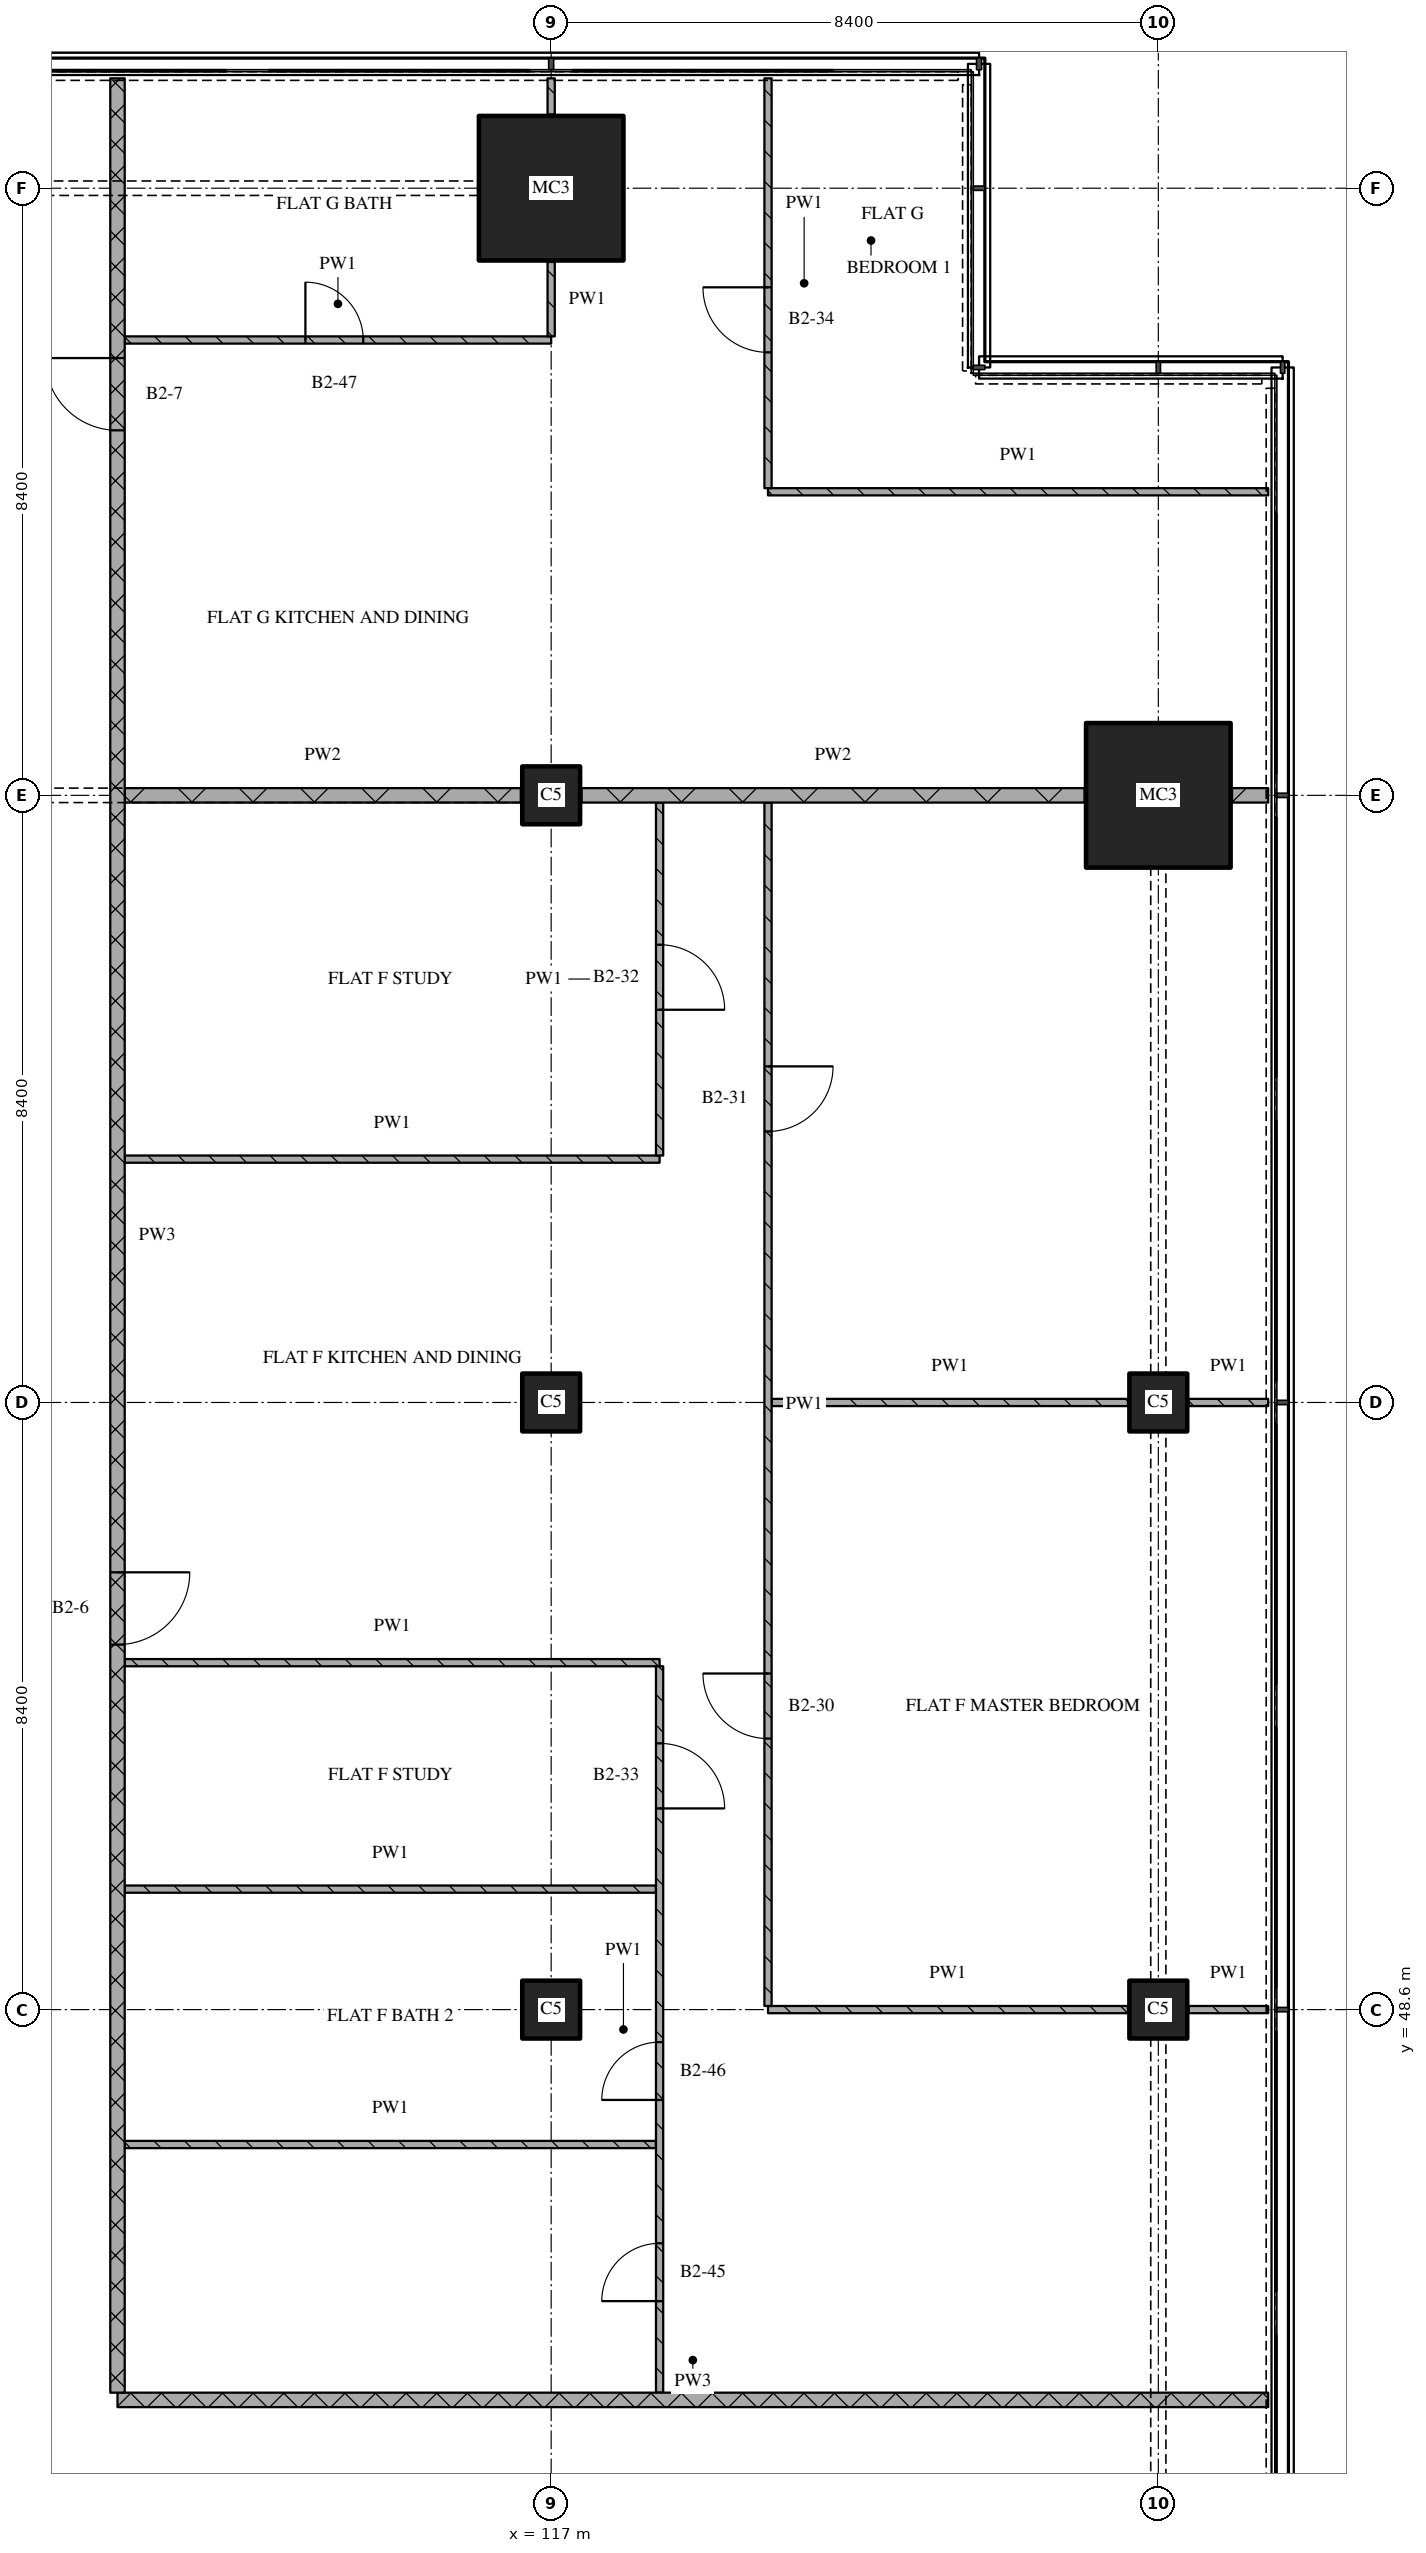
"""IFC4 building model, lengths in metres.
Left out: names, types, materials, properties, quantities, classifications, styles, units other than length and angle.
Written with IfcOpenShell. Run it as: python <this file> out.ifc"""

import sys

from ifc_helpers import new_model, si_unit, direction, frame, frame_2d, origin, origin_2d, place, context, subcontext, project, spatial, rectangle, extrude, element, fill, save


model = new_model("IFC4")
c1 = context("Model", 3, precision=1e-05, world=origin(), true_north=direction((0.0, 1.0)))
c2 = subcontext(c1, "Body", "Model", "MODEL_VIEW")
j1 = project(units=[si_unit("LENGTHUNIT", "METRE"), si_unit("PLANEANGLEUNIT", "RADIAN")], contexts=[c1])
p1 = place(None, origin())
s1 = spatial("IfcSite", under=j1, at=p1, CompositionType="ELEMENT")
p2 = place(p1, origin())
s2 = spatial("IfcBuilding", under=s1, at=p2, CompositionType="ELEMENT")
p3 = place(p2, frame((0.0, 0.0, 109.65)))
s3 = spatial("IfcBuildingStorey", under=s2, at=p3, CompositionType="ELEMENT", Elevation=109.65)
for number, where, z_axis, x_axis in (
    (1, (117.0, 48.6, 0.0), (0.0, 0.0, 1.0), (1.0, 0.0, 0.0)),
    (2, (117.0, 57.0, 0.0), (0.0, 0.0, 1.0), (1.0, 0.0, 0.0)),
    (3, (117.0, 65.4, 0.0), (0.0, 0.0, 1.0), (1.0, 0.0, 0.0)),
):
    element("IfcColumn", number, at=place(p3, frame(where, z_axis=z_axis, x_axis=x_axis)), inside=s3, PredefinedType="COLUMN", context=c2, shape_type="SweptSolid", body=[
        extrude(rectangle(XDim=0.8, YDim=0.8, at=origin_2d()), origin(), (0.0, 0.0, 1.0), 3.6),
    ])
p4 = place(p3, frame((117.0, 73.8, 0.0), z_axis=(0.0, 0.0, 1.0), x_axis=(1.0, 0.0, 0.0)))
e4 = element("IfcColumn", 4, at=p4, inside=s3, PredefinedType="COLUMN", context=c2, shape_type="SweptSolid", body=[
    extrude(rectangle(XDim=2.0, YDim=2.0, at=origin_2d()), origin(), (0.0, 0.0, 1.0), 3.6),
])
for number, where, z_axis, x_axis in (
    (5, (125.4, 48.6, 0.0), (0.0, 0.0, 1.0), (1.0, 0.0, 0.0)),
    (6, (125.4, 57.0, 0.0), (0.0, 0.0, 1.0), (1.0, 0.0, 0.0)),
):
    element("IfcColumn", number, at=place(p3, frame(where, z_axis=z_axis, x_axis=x_axis)), inside=s3, PredefinedType="COLUMN", context=c2, shape_type="SweptSolid", body=[
        extrude(rectangle(XDim=0.8, YDim=0.8, at=origin_2d()), origin(), (0.0, 0.0, 1.0), 3.6),
    ])
p5 = place(p3, frame((125.4, 65.4, 0.0), z_axis=(0.0, 0.0, 1.0), x_axis=(1.0, 0.0, 0.0)))
e7 = element("IfcColumn", 7, at=p5, inside=s3, PredefinedType="COLUMN", context=c2, shape_type="SweptSolid", body=[
    extrude(rectangle(XDim=2.0, YDim=2.0, at=origin_2d()), origin(), (0.0, 0.0, 1.0), 3.6),
])
p6 = place(p3, frame((111.0, 43.2, 0.0), z_axis=(0.0, 0.0, 1.0), x_axis=(1.0, 0.0, 0.0)))
e8 = element("IfcWall", 8, at=p6, inside=s3, PredefinedType="PARTITIONING", context=c2, shape_type="SweptSolid", body=[
    extrude(rectangle(XDim=15.92, YDim=0.2, at=frame_2d((7.96, 0.0))), origin(), (0.0, 0.0, 1.0), 3.32),
])
p7 = place(p3, frame((111.1, 46.733, 0.0), z_axis=(0.0, 0.0, 1.0), x_axis=(1.0, 0.0, 0.0)))
e9 = element("IfcWall", 9, at=p7, inside=s3, PredefinedType="PARTITIONING", context=c2, shape_type="SweptSolid", body=[
    extrude(rectangle(XDim=7.35, YDim=0.1, at=frame_2d((3.675, 0.0))), origin(), (0.0, 0.0, 1.0), 3.32),
])
p8 = place(p3, frame((120.0, 48.6, 0.0), z_axis=(0.0, 0.0, 1.0), x_axis=(1.0, 0.0, 0.0)))
e10 = element("IfcWall", 10, at=p8, inside=s3, PredefinedType="PARTITIONING", context=c2, shape_type="SweptSolid", body=[
    extrude(rectangle(XDim=4.98, YDim=0.1, at=frame_2d((2.49, 0.0))), origin(), (0.0, 0.0, 1.0), 3.32),
])
p9 = place(p3, frame((125.82, 48.6, 0.0), z_axis=(0.0, 0.0, 1.0), x_axis=(1.0, 0.0, 0.0)))
e11 = element("IfcWall", 11, at=p9, inside=s3, PredefinedType="PARTITIONING", context=c2, shape_type="SweptSolid", body=[
    extrude(rectangle(XDim=1.1, YDim=0.1, at=frame_2d((0.55, 0.0))), origin(), (0.0, 0.0, 1.0), 3.32),
])
p10 = place(p3, frame((111.1, 50.267, 0.0), z_axis=(0.0, 0.0, 1.0), x_axis=(1.0, 0.0, 0.0)))
e12 = element("IfcWall", 12, at=p10, inside=s3, PredefinedType="PARTITIONING", context=c2, shape_type="SweptSolid", body=[
    extrude(rectangle(XDim=7.35, YDim=0.1, at=frame_2d((3.675, 0.0))), origin(), (0.0, 0.0, 1.0), 3.32),
])
p11 = place(p3, frame((111.1, 53.4, 0.0), z_axis=(0.0, 0.0, 1.0), x_axis=(1.0, 0.0, 0.0)))
e13 = element("IfcWall", 13, at=p11, inside=s3, PredefinedType="PARTITIONING", context=c2, shape_type="SweptSolid", body=[
    extrude(rectangle(XDim=7.4, YDim=0.1, at=frame_2d((3.7, 0.0))), origin(), (0.0, 0.0, 1.0), 3.32),
])
p12 = place(p3, frame((120.05, 57.0, 0.0), z_axis=(0.0, 0.0, 1.0), x_axis=(1.0, 0.0, 0.0)))
e14 = element("IfcWall", 14, at=p12, inside=s3, PredefinedType="PARTITIONING", context=c2, shape_type="SweptSolid", body=[
    extrude(rectangle(XDim=4.93, YDim=0.1, at=frame_2d((2.465, 0.0))), origin(), (0.0, 0.0, 1.0), 3.32),
])
p13 = place(p3, frame((125.82, 57.0, 0.0), z_axis=(0.0, 0.0, 1.0), x_axis=(1.0, 0.0, 0.0)))
e15 = element("IfcWall", 15, at=p13, inside=s3, PredefinedType="PARTITIONING", context=c2, shape_type="SweptSolid", body=[
    extrude(rectangle(XDim=1.1, YDim=0.1, at=frame_2d((0.55, 0.0))), origin(), (0.0, 0.0, 1.0), 3.32),
])
p14 = place(p3, frame((111.1, 60.367, 0.0), z_axis=(0.0, 0.0, 1.0), x_axis=(1.0, 0.0, 0.0)))
e16 = element("IfcWall", 16, at=p14, inside=s3, PredefinedType="PARTITIONING", context=c2, shape_type="SweptSolid", body=[
    extrude(rectangle(XDim=7.4, YDim=0.1, at=frame_2d((3.7, 0.0))), origin(), (0.0, 0.0, 1.0), 3.32),
])
p15 = place(p3, frame((111.1, 65.4, 0.0), z_axis=(0.0, 0.0, 1.0), x_axis=(1.0, 0.0, 0.0)))
e17 = element("IfcWall", 17, at=p15, inside=s3, PredefinedType="PARTITIONING", context=c2, shape_type="SweptSolid", body=[
    extrude(rectangle(XDim=5.48, YDim=0.2, at=frame_2d((2.74, 0.0))), origin(), (0.0, 0.0, 1.0), 2.82),
])
p16 = place(p3, frame((117.42, 65.4, 0.0), z_axis=(0.0, 0.0, 1.0), x_axis=(1.0, 0.0, 0.0)))
e18 = element("IfcWall", 18, at=p16, inside=s3, PredefinedType="PARTITIONING", context=c2, shape_type="SweptSolid", body=[
    extrude(rectangle(XDim=6.96, YDim=0.2, at=frame_2d((3.48, 0.0))), origin(), (0.0, 0.0, 1.0), 3.32),
])
p17 = place(p3, frame((126.42, 65.4, 0.0), z_axis=(0.0, 0.0, 1.0), x_axis=(1.0, 0.0, 0.0)))
e19 = element("IfcWall", 19, at=p17, inside=s3, PredefinedType="PARTITIONING", context=c2, shape_type="SweptSolid", body=[
    extrude(rectangle(XDim=0.5, YDim=0.2, at=frame_2d((0.25, 0.0))), origin(), (0.0, 0.0, 1.0), 3.32),
])
p18 = place(p3, frame((120.0, 69.6, 0.0), z_axis=(0.0, 0.0, 1.0), x_axis=(1.0, 0.0, 0.0)))
e20 = element("IfcWall", 20, at=p18, inside=s3, PredefinedType="PARTITIONING", context=c2, shape_type="SweptSolid", body=[
    extrude(rectangle(XDim=6.92, YDim=0.1, at=frame_2d((3.46, 0.0))), origin(), (0.0, 0.0, 1.0), 3.32),
])
p19 = place(p3, frame((111.1, 71.7, 0.0), z_axis=(0.0, 0.0, 1.0), x_axis=(1.0, 0.0, 0.0)))
e21 = element("IfcWall", 21, at=p19, inside=s3, PredefinedType="PARTITIONING", context=c2, shape_type="SweptSolid", body=[
    extrude(rectangle(XDim=5.9, YDim=0.1, at=frame_2d((2.95, 0.0))), origin(), (0.0, 0.0, 1.0), 3.32),
])
p20 = place(p19, frame((2.5, 0.0, 0.0)))
e22 = element("IfcOpeningElement", 22, at=p20, cuts=e21, PredefinedType="OPENING", context=c2, shape_type="SweptSolid", body=[
    extrude(rectangle(XDim=0.8, YDim=2.1, at=frame_2d((0.4, 1.05))), frame((0.0, 0.06, 0.0), z_axis=(0.0, -1.0, 0.0), x_axis=(1.0, 0.0, 0.0)), (0.0, 0.0, 1.0), 0.12),
])
p21 = place(p3, frame((111.0, 75.32, 0.0), z_axis=(0.0, 0.0, 1.0), x_axis=(0.0, -1.0, 0.0)))
e23 = element("IfcWall", 23, at=p21, inside=s3, PredefinedType="PARTITIONING", context=c2, shape_type="SweptSolid", body=[
    extrude(rectangle(XDim=32.02, YDim=0.2, at=frame_2d((16.01, 0.0))), origin(), (0.0, 0.0, 1.0), 3.32),
])
p22 = place(p21, frame((3.87, 0.0, 0.0)))
e24 = element("IfcOpeningElement", 24, at=p22, cuts=e23, PredefinedType="OPENING", context=c2, shape_type="SweptSolid", body=[
    extrude(rectangle(XDim=1.0, YDim=2.1, at=frame_2d((0.5, 1.05))), frame((0.0, 0.11, 0.0), z_axis=(0.0, -1.0, 0.0), x_axis=(1.0, 0.0, 0.0)), (0.0, 0.0, 1.0), 0.22),
])
p23 = place(p21, frame((20.67, 0.0, 0.0)))
e25 = element("IfcOpeningElement", 25, at=p23, cuts=e23, PredefinedType="OPENING", context=c2, shape_type="SweptSolid", body=[
    extrude(rectangle(XDim=1.0, YDim=2.1, at=frame_2d((0.5, 1.05))), frame((0.0, 0.11, 0.0), z_axis=(0.0, -1.0, 0.0), x_axis=(1.0, 0.0, 0.0)), (0.0, 0.0, 1.0), 0.22),
])
p24 = place(p3, frame((117.0, 72.78, 0.0), z_axis=(0.0, 0.0, 1.0), x_axis=(0.0, -1.0, 0.0)))
e26 = element("IfcWall", 26, at=p24, inside=s3, PredefinedType="PARTITIONING", context=c2, shape_type="SweptSolid", body=[
    extrude(rectangle(XDim=1.03, YDim=0.1, at=frame_2d((0.515, 0.0))), origin(), (0.0, 0.0, 1.0), 3.32),
])
p25 = place(p3, frame((117.0, 75.32, 0.0), z_axis=(0.0, 0.0, 1.0), x_axis=(0.0, -1.0, 0.0)))
e27 = element("IfcWall", 27, at=p25, inside=s3, PredefinedType="PARTITIONING", context=c2, shape_type="SweptSolid", body=[
    extrude(rectangle(XDim=0.5, YDim=0.1, at=frame_2d((0.25, 0.0))), origin(), (0.0, 0.0, 1.0), 3.32),
])
p26 = place(p3, frame((118.5, 43.3, 0.0), z_axis=(0.0, 0.0, 1.0), x_axis=(0.0, 1.0, 0.0)))
e28 = element("IfcWall", 28, at=p26, inside=s3, PredefinedType="PARTITIONING", context=c2, shape_type="SweptSolid", body=[
    extrude(rectangle(XDim=10.05, YDim=0.1, at=frame_2d((5.025, 0.0))), origin(), (0.0, 0.0, 1.0), 3.32),
])
p27 = place(p26, frame((1.267, 0.0, 0.0)))
e29 = element("IfcOpeningElement", 29, at=p27, cuts=e28, PredefinedType="OPENING", context=c2, shape_type="SweptSolid", body=[
    extrude(rectangle(XDim=0.8, YDim=2.1, at=frame_2d((0.4, 1.05))), frame((0.0, 0.06, 0.0), z_axis=(0.0, -1.0, 0.0), x_axis=(1.0, 0.0, 0.0)), (0.0, 0.0, 1.0), 0.12),
])
p28 = place(p26, frame((4.05, 0.0, 0.0)))
e30 = element("IfcOpeningElement", 30, at=p28, cuts=e28, PredefinedType="OPENING", context=c2, shape_type="SweptSolid", body=[
    extrude(rectangle(XDim=0.8, YDim=2.1, at=frame_2d((0.4, 1.05))), frame((0.0, 0.06, 0.0), z_axis=(0.0, -1.0, 0.0), x_axis=(1.0, 0.0, 0.0)), (0.0, 0.0, 1.0), 0.12),
])
p29 = place(p26, frame((8.083, 0.0, 0.0)))
e31 = element("IfcOpeningElement", 31, at=p29, cuts=e28, PredefinedType="OPENING", context=c2, shape_type="SweptSolid", body=[
    extrude(rectangle(XDim=0.9, YDim=2.1, at=frame_2d((0.45, 1.05))), frame((0.0, 0.06, 0.0), z_axis=(0.0, -1.0, 0.0), x_axis=(1.0, 0.0, 0.0)), (0.0, 0.0, 1.0), 0.12),
])
p30 = place(p3, frame((118.5, 60.417, 0.0), z_axis=(0.0, 0.0, 1.0), x_axis=(0.0, 1.0, 0.0)))
e32 = element("IfcWall", 32, at=p30, inside=s3, PredefinedType="PARTITIONING", context=c2, shape_type="SweptSolid", body=[
    extrude(rectangle(XDim=4.883, YDim=0.1, at=frame_2d((2.442, 0.0))), origin(), (0.0, 0.0, 1.0), 3.32),
])
p31 = place(p30, frame((2.017, 0.0, 0.0)))
e33 = element("IfcOpeningElement", 33, at=p31, cuts=e32, PredefinedType="OPENING", context=c2, shape_type="SweptSolid", body=[
    extrude(rectangle(XDim=0.9, YDim=2.1, at=frame_2d((0.45, 1.05))), frame((0.0, 0.06, 0.0), z_axis=(0.0, -1.0, 0.0), x_axis=(1.0, 0.0, 0.0)), (0.0, 0.0, 1.0), 0.12),
])
p32 = place(p3, frame((120.0, 65.3, 0.0), z_axis=(0.0, 0.0, 1.0), x_axis=(0.0, -1.0, 0.0)))
e34 = element("IfcWall", 34, at=p32, inside=s3, PredefinedType="PARTITIONING", context=c2, shape_type="SweptSolid", body=[
    extrude(rectangle(XDim=16.65, YDim=0.1, at=frame_2d((8.325, 0.0))), origin(), (0.0, 0.0, 1.0), 3.32),
])
p33 = place(p32, frame((3.65, 0.0, 0.0)))
e35 = element("IfcOpeningElement", 35, at=p33, cuts=e34, PredefinedType="OPENING", context=c2, shape_type="SweptSolid", body=[
    extrude(rectangle(XDim=0.9, YDim=2.1, at=frame_2d((0.45, 1.05))), frame((0.0, 0.06, 0.0), z_axis=(0.0, -1.0, 0.0), x_axis=(1.0, 0.0, 0.0)), (0.0, 0.0, 1.0), 0.12),
])
p34 = place(p32, frame((12.05, 0.0, 0.0)))
e36 = element("IfcOpeningElement", 36, at=p34, cuts=e34, PredefinedType="OPENING", context=c2, shape_type="SweptSolid", body=[
    extrude(rectangle(XDim=0.9, YDim=2.1, at=frame_2d((0.45, 1.05))), frame((0.0, 0.06, 0.0), z_axis=(0.0, -1.0, 0.0), x_axis=(1.0, 0.0, 0.0)), (0.0, 0.0, 1.0), 0.12),
])
p35 = place(p3, frame((120.0, 75.32, 0.0), z_axis=(0.0, 0.0, 1.0), x_axis=(0.0, -1.0, 0.0)))
e37 = element("IfcWall", 37, at=p35, inside=s3, PredefinedType="PARTITIONING", context=c2, shape_type="SweptSolid", body=[
    extrude(rectangle(XDim=5.67, YDim=0.1, at=frame_2d((2.835, 0.0))), origin(), (0.0, 0.0, 1.0), 3.32),
])
p36 = place(p35, frame((2.891, 0.0, 0.0)))
e38 = element("IfcOpeningElement", 38, at=p36, cuts=e37, PredefinedType="OPENING", context=c2, shape_type="SweptSolid", body=[
    extrude(rectangle(XDim=0.9, YDim=2.1, at=frame_2d((0.45, 1.05))), frame((0.0, 0.06, 0.0), z_axis=(0.0, -1.0, 0.0), x_axis=(1.0, 0.0, 0.0)), (0.0, 0.0, 1.0), 0.12),
])
p37 = place(p20, origin())
e39 = element("IfcDoor", 39, at=p37, inside=s3, OperationType="SINGLE_SWING_LEFT", PredefinedType="DOOR", context=c2, shape_type="SweptSolid", body=[
    extrude(rectangle(XDim=0.8, YDim=2.1, at=frame_2d((0.4, 1.05))), frame((0.0, 0.025, 0.0), z_axis=(0.0, -1.0, 0.0), x_axis=(1.0, 0.0, 0.0)), (0.0, 0.0, 1.0), 0.05),
])
fill(e22, e39)
p38 = place(p22, origin())
e40 = element("IfcDoor", 40, at=p38, inside=s3, OperationType="SINGLE_SWING_RIGHT", PredefinedType="DOOR", context=c2, shape_type="SweptSolid", body=[
    extrude(rectangle(XDim=1.0, YDim=2.1, at=frame_2d((0.5, 1.05))), frame((0.0, 0.025, 0.0), z_axis=(0.0, -1.0, 0.0), x_axis=(1.0, 0.0, 0.0)), (0.0, 0.0, 1.0), 0.05),
])
fill(e24, e40)
p39 = place(p23, origin())
e41 = element("IfcDoor", 41, at=p39, inside=s3, OperationType="SINGLE_SWING_LEFT", PredefinedType="DOOR", context=c2, shape_type="SweptSolid", body=[
    extrude(rectangle(XDim=1.0, YDim=2.1, at=frame_2d((0.5, 1.05))), frame((0.0, 0.025, 0.0), z_axis=(0.0, -1.0, 0.0), x_axis=(1.0, 0.0, 0.0)), (0.0, 0.0, 1.0), 0.05),
])
fill(e25, e41)
p40 = place(p27, origin())
e42 = element("IfcDoor", 42, at=p40, inside=s3, OperationType="SINGLE_SWING_LEFT", PredefinedType="DOOR", context=c2, shape_type="SweptSolid", body=[
    extrude(rectangle(XDim=0.8, YDim=2.1, at=frame_2d((0.4, 1.05))), frame((0.0, 0.025, 0.0), z_axis=(0.0, -1.0, 0.0), x_axis=(1.0, 0.0, 0.0)), (0.0, 0.0, 1.0), 0.05),
])
fill(e29, e42)
p41 = place(p28, origin())
e43 = element("IfcDoor", 43, at=p41, inside=s3, OperationType="SINGLE_SWING_LEFT", PredefinedType="DOOR", context=c2, shape_type="SweptSolid", body=[
    extrude(rectangle(XDim=0.8, YDim=2.1, at=frame_2d((0.4, 1.05))), frame((0.0, 0.025, 0.0), z_axis=(0.0, -1.0, 0.0), x_axis=(1.0, 0.0, 0.0)), (0.0, 0.0, 1.0), 0.05),
])
fill(e30, e43)
p42 = place(p29, origin())
e44 = element("IfcDoor", 44, at=p42, inside=s3, OperationType="SINGLE_SWING_RIGHT", PredefinedType="DOOR", context=c2, shape_type="SweptSolid", body=[
    extrude(rectangle(XDim=0.9, YDim=2.1, at=frame_2d((0.45, 1.05))), frame((0.0, 0.025, 0.0), z_axis=(0.0, -1.0, 0.0), x_axis=(1.0, 0.0, 0.0)), (0.0, 0.0, 1.0), 0.05),
])
fill(e31, e44)
p43 = place(p31, origin())
e45 = element("IfcDoor", 45, at=p43, inside=s3, OperationType="SINGLE_SWING_RIGHT", PredefinedType="DOOR", context=c2, shape_type="SweptSolid", body=[
    extrude(rectangle(XDim=0.9, YDim=2.1, at=frame_2d((0.45, 1.05))), frame((0.0, 0.025, 0.0), z_axis=(0.0, -1.0, 0.0), x_axis=(1.0, 0.0, 0.0)), (0.0, 0.0, 1.0), 0.05),
])
fill(e33, e45)
p44 = place(p33, origin())
e46 = element("IfcDoor", 46, at=p44, inside=s3, OperationType="SINGLE_SWING_LEFT", PredefinedType="DOOR", context=c2, shape_type="SweptSolid", body=[
    extrude(rectangle(XDim=0.9, YDim=2.1, at=frame_2d((0.45, 1.05))), frame((0.0, 0.025, 0.0), z_axis=(0.0, -1.0, 0.0), x_axis=(1.0, 0.0, 0.0)), (0.0, 0.0, 1.0), 0.05),
])
fill(e35, e46)
p45 = place(p34, origin())
e47 = element("IfcDoor", 47, at=p45, inside=s3, OperationType="SINGLE_SWING_RIGHT", PredefinedType="DOOR", context=c2, shape_type="SweptSolid", body=[
    extrude(rectangle(XDim=0.9, YDim=2.1, at=frame_2d((0.45, 1.05))), frame((0.0, 0.025, 0.0), z_axis=(0.0, -1.0, 0.0), x_axis=(1.0, 0.0, 0.0)), (0.0, 0.0, 1.0), 0.05),
])
fill(e36, e47)
p46 = place(p36, origin())
e48 = element("IfcDoor", 48, at=p46, inside=s3, OperationType="SINGLE_SWING_RIGHT", PredefinedType="DOOR", context=c2, shape_type="SweptSolid", body=[
    extrude(rectangle(XDim=0.9, YDim=2.1, at=frame_2d((0.45, 1.05))), frame((0.0, 0.025, 0.0), z_axis=(0.0, -1.0, 0.0), x_axis=(1.0, 0.0, 0.0)), (0.0, 0.0, 1.0), 0.05),
])
fill(e38, e48)
save(model, sys.argv[1])
